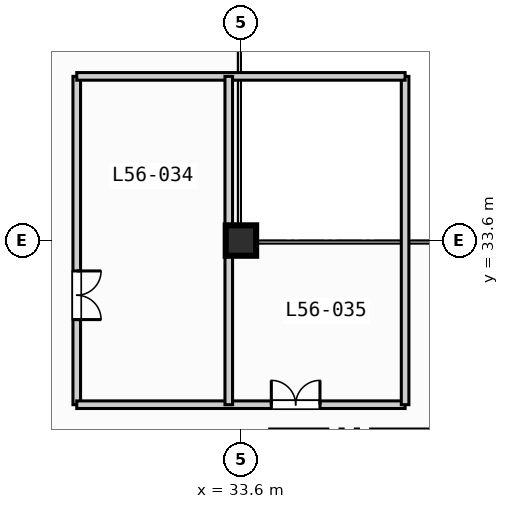
"""IFC4 building model, lengths in metres.
Left out: names, types, materials, properties, quantities, classifications, styles, units other than length and angle.
Written with IfcOpenShell. Run it as: python <this file> out.ifc"""

import sys

from ifc_helpers import new_model, si_unit, direction, frame, frame_2d, origin, origin_2d, place, context, subcontext, project, spatial, rectangle, extrude, element, fill, save


model = new_model("IFC4")
c1 = context("Model", 3, precision=1e-05, world=origin(), true_north=direction((0.0, 1.0)))
c2 = subcontext(c1, "Body", "Model", "MODEL_VIEW")
j1 = project(units=[si_unit("LENGTHUNIT", "METRE"), si_unit("PLANEANGLEUNIT", "RADIAN")], contexts=[c1])
p1 = place(None, origin())
s1 = spatial("IfcSite", under=j1, at=p1, CompositionType="ELEMENT")
p2 = place(p1, origin())
s2 = spatial("IfcBuilding", under=s1, at=p2, CompositionType="ELEMENT")
p3 = place(p2, frame((0.0, 0.0, 228.2)))
s3 = spatial("IfcBuildingStorey", under=s2, at=p3, CompositionType="ELEMENT", Elevation=228.2)
p4 = place(p3, frame((33.6, 33.6, 0.0), z_axis=(0.0, 0.0, 1.0), x_axis=(1.0, 0.0, 0.0)))
e1 = element("IfcColumn", 1, at=p4, inside=s3, PredefinedType="COLUMN", context=c2, shape_type="SweptSolid", body=[
    extrude(rectangle(XDim=1.0, YDim=1.0, at=origin_2d()), origin(), (0.0, 0.0, 1.0), 6.0),
])
p5 = place(p3, frame((28.2, 28.2, 0.0), z_axis=(0.0, 0.0, 1.0), x_axis=(0.0, 1.0, 0.0)))
e2 = element("IfcWall", 2, at=p5, inside=s3, PredefinedType="SOLIDWALL", context=c2, shape_type="SweptSolid", body=[
    extrude(rectangle(XDim=10.8, YDim=0.25, at=frame_2d((5.4, 0.0))), origin(), (0.0, 0.0, 1.0), 5.77),
])
p6 = place(p5, frame((2.8, 0.0, 0.0)))
e3 = element("IfcOpeningElement", 3, at=p6, cuts=e2, PredefinedType="OPENING", context=c2, shape_type="SweptSolid", body=[
    extrude(rectangle(XDim=1.6, YDim=2.2, at=frame_2d((0.8, 1.1))), frame((0.0, 0.135, 0.0), z_axis=(0.0, -1.0, 0.0), x_axis=(1.0, 0.0, 0.0)), (0.0, 0.0, 1.0), 0.27),
])
p7 = place(p3, frame((28.2, 28.2, 0.0), z_axis=(0.0, 0.0, 1.0), x_axis=(1.0, 0.0, 0.0)))
e4 = element("IfcWall", 4, at=p7, inside=s3, PredefinedType="SOLIDWALL", context=c2, shape_type="SweptSolid", body=[
    extrude(rectangle(XDim=10.8, YDim=0.25, at=frame_2d((5.4, 0.0))), origin(), (0.0, 0.0, 1.0), 5.77),
])
p8 = place(p7, frame((6.4, 0.0, 0.0)))
e5 = element("IfcOpeningElement", 5, at=p8, cuts=e4, PredefinedType="OPENING", context=c2, shape_type="SweptSolid", body=[
    extrude(rectangle(XDim=1.6, YDim=2.2, at=frame_2d((0.8, 1.1))), frame((0.0, 0.135, 0.0), z_axis=(0.0, -1.0, 0.0), x_axis=(1.0, 0.0, 0.0)), (0.0, 0.0, 1.0), 0.27),
])
for number, where, z_axis, x_axis in (
    (6, (39.0, 28.2, 0.0), (0.0, 0.0, 1.0), (0.0, 1.0, 0.0)),
    (7, (28.2, 39.0, 0.0), (0.0, 0.0, 1.0), (1.0, 0.0, 0.0)),
    (8, (33.2, 28.2, 0.0), (0.0, 0.0, 1.0), (0.0, 1.0, 0.0)),
):
    element("IfcWall", number, at=place(p3, frame(where, z_axis=z_axis, x_axis=x_axis)), inside=s3, PredefinedType="SOLIDWALL", context=c2, shape_type="SweptSolid", body=[
        extrude(rectangle(XDim=10.8, YDim=0.25, at=frame_2d((5.4, 0.0))), origin(), (0.0, 0.0, 1.0), 5.77),
    ])
p9 = place(p6, origin())
e9 = element("IfcDoor", 9, at=p9, inside=s3, OperationType="SINGLE_SWING_RIGHT", PredefinedType="DOOR", context=c2, shape_type="SweptSolid", body=[
    extrude(rectangle(XDim=1.6, YDim=2.2, at=frame_2d((0.8, 1.1))), frame((0.0, 0.025, 0.0), z_axis=(0.0, -1.0, 0.0), x_axis=(1.0, 0.0, 0.0)), (0.0, 0.0, 1.0), 0.05),
])
fill(e3, e9)
p10 = place(p8, origin())
e10 = element("IfcDoor", 10, at=p10, inside=s3, OperationType="SINGLE_SWING_LEFT", PredefinedType="DOOR", context=c2, shape_type="SweptSolid", body=[
    extrude(rectangle(XDim=1.6, YDim=2.2, at=frame_2d((0.8, 1.1))), frame((0.0, 0.025, 0.0), z_axis=(0.0, -1.0, 0.0), x_axis=(1.0, 0.0, 0.0)), (0.0, 0.0, 1.0), 0.05),
])
fill(e5, e10)
save(model, sys.argv[1])
